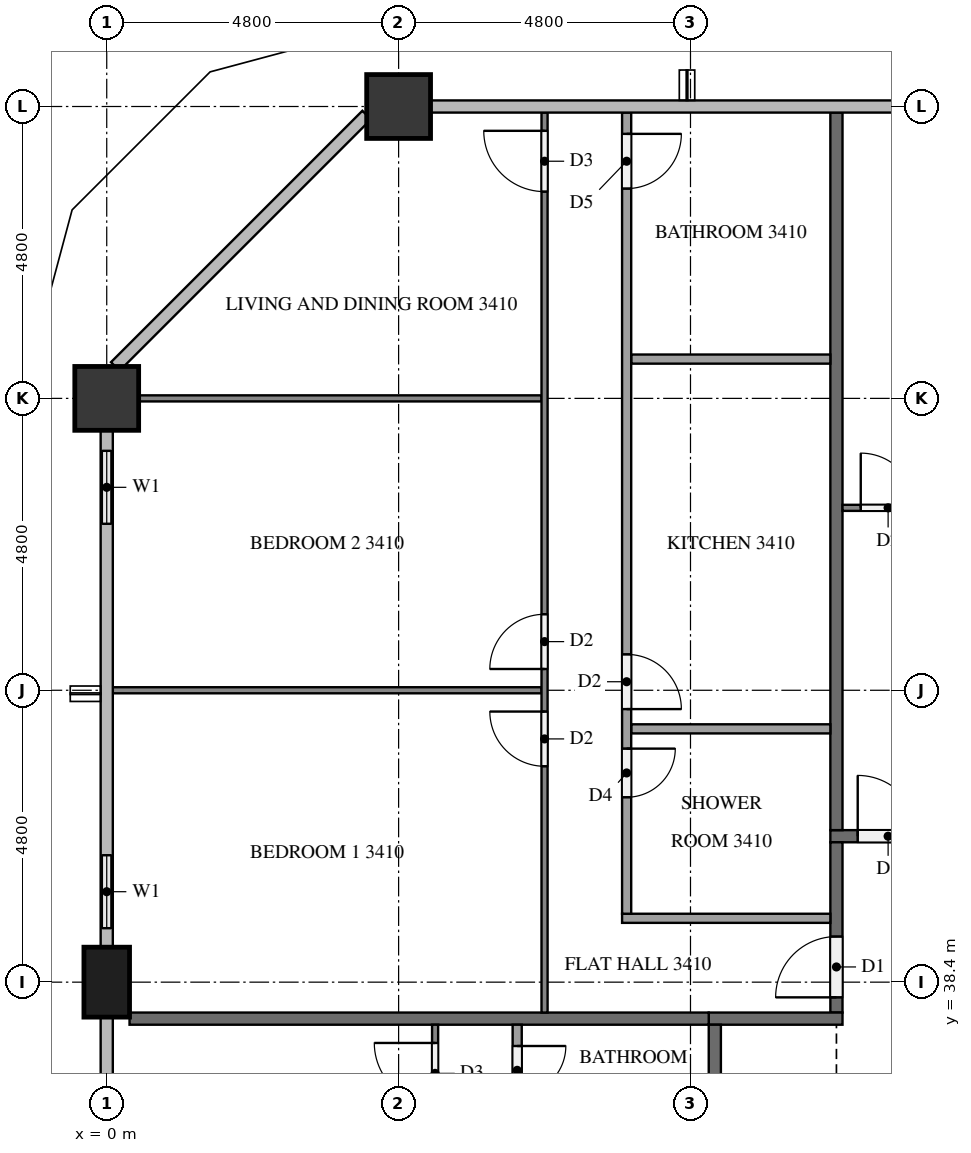
"""IFC4 building model, lengths in metres.
Left out: names, types, materials, properties, quantities, classifications, styles, units other than length and angle.
Written with IfcOpenShell. Run it as: python <this file> out.ifc"""

import sys

from ifc_helpers import new_model, si_unit, direction, frame, frame_2d, origin, origin_2d, place, context, subcontext, project, spatial, rectangle, extrude, element, fill, save


model = new_model("IFC4")
c1 = context("Model", 3, precision=1e-05, world=origin(), true_north=direction((0.0, 1.0)))
c2 = subcontext(c1, "Body", "Model", "MODEL_VIEW")
j1 = project(units=[si_unit("LENGTHUNIT", "METRE"), si_unit("PLANEANGLEUNIT", "RADIAN")], contexts=[c1])
p1 = place(None, origin())
s1 = spatial("IfcSite", under=j1, at=p1, CompositionType="ELEMENT")
p2 = place(p1, origin())
s2 = spatial("IfcBuilding", under=s1, at=p2, CompositionType="ELEMENT")
p3 = place(p2, frame((0.0, 0.0, 133.1)))
s3 = spatial("IfcBuildingStorey", under=s2, at=p3, CompositionType="ELEMENT", Elevation=133.1)
for number, where, z_axis, x_axis in (
    (1, (4.8, 52.8, 0.0), (0.0, 0.0, 1.0), (1.0, 0.0, 0.0)),
    (2, (0.0, 48.0, 0.0), (0.0, 0.0, 1.0), (1.0, 0.0, 0.0)),
):
    element("IfcColumn", number, at=place(p3, frame(where, z_axis=z_axis, x_axis=x_axis)), inside=s3, PredefinedType="COLUMN", context=c2, shape_type="SweptSolid", body=[
        extrude(rectangle(XDim=1.05, YDim=1.05, at=origin_2d()), origin(), (0.0, 0.0, 1.0), 3.2),
    ])
p4 = place(p3, frame((0.0, 38.4, 0.0), z_axis=(0.0, 0.0, 1.0), x_axis=(0.0, 1.0, 0.0)))
e3 = element("IfcColumn", 3, at=p4, inside=s3, PredefinedType="COLUMN", context=c2, shape_type="SweptSolid", body=[
    extrude(rectangle(XDim=1.15, YDim=0.75, at=origin_2d()), origin(), (0.0, 0.0, 1.0), 3.2),
])
p5 = place(p3, frame((0.0, 47.475, 0.0), z_axis=(0.0, 0.0, 1.0), x_axis=(0.0, -1.0, 0.0)))
e4 = element("IfcWall", 4, at=p5, inside=s3, PredefinedType="SOLIDWALL", context=c2, shape_type="SweptSolid", body=[
    extrude(rectangle(XDim=1.875, YDim=0.15, at=frame_2d((0.938, 0.0))), origin(), (0.0, 0.0, 1.0), 3.2),
])
p6 = place(p5, frame((0.337, 0.0, 0.9)))
e5 = element("IfcOpeningElement", 5, at=p6, cuts=e4, PredefinedType="OPENING", context=c2, shape_type="SweptSolid", body=[
    extrude(rectangle(XDim=1.2, YDim=1.4, at=frame_2d((0.6, 0.7))), frame((0.0, 0.085, 0.0), z_axis=(0.0, -1.0, 0.0), x_axis=(1.0, 0.0, 0.0)), (0.0, 0.0, 1.0), 0.17),
])
p7 = place(p3, frame((0.0, 40.8, 0.0), z_axis=(0.0, 0.0, 1.0), x_axis=(0.0, -1.0, 0.0)))
e6 = element("IfcWall", 6, at=p7, inside=s3, PredefinedType="SOLIDWALL", context=c2, shape_type="SweptSolid", body=[
    extrude(rectangle(XDim=1.825, YDim=0.15, at=frame_2d((0.913, 0.0))), origin(), (0.0, 0.0, 1.0), 3.2),
])
p8 = place(p7, frame((0.312, 0.0, 0.9)))
e7 = element("IfcOpeningElement", 7, at=p8, cuts=e6, PredefinedType="OPENING", context=c2, shape_type="SweptSolid", body=[
    extrude(rectangle(XDim=1.2, YDim=1.4, at=frame_2d((0.6, 0.7))), frame((0.0, 0.085, 0.0), z_axis=(0.0, -1.0, 0.0), x_axis=(1.0, 0.0, 0.0)), (0.0, 0.0, 1.0), 0.17),
])
p9 = place(p3, frame((11.9, 40.8, 0.0), z_axis=(0.0, 0.0, 1.0), x_axis=(1.0, 0.0, 0.0)))
e8 = element("IfcWall", 8, at=p9, inside=s3, PredefinedType="PARTITIONING", context=c2, shape_type="SweptSolid", body=[
    extrude(rectangle(XDim=38.6, YDim=0.2, at=frame_2d((19.3, 0.0))), origin(), (0.0, 0.0, 1.0), 3.2),
])
p10 = place(p9, frame((37.15, 0.0, 0.0)))
e9 = element("IfcOpeningElement", 9, at=p10, cuts=e8, PredefinedType="OPENING", context=c2, shape_type="SweptSolid", body=[
    extrude(rectangle(XDim=1.0, YDim=2.1, at=frame_2d((0.5, 1.05))), frame((0.0, 0.11, 0.0), z_axis=(0.0, -1.0, 0.0), x_axis=(1.0, 0.0, 0.0)), (0.0, 0.0, 1.0), 0.22),
])
p11 = place(p9, frame((10.05, 0.0, 0.0)))
e10 = element("IfcOpeningElement", 10, at=p11, cuts=e8, PredefinedType="OPENING", context=c2, shape_type="SweptSolid", body=[
    extrude(rectangle(XDim=1.0, YDim=2.1, at=frame_2d((0.5, 1.05))), frame((0.0, 0.11, 0.0), z_axis=(0.0, -1.0, 0.0), x_axis=(1.0, 0.0, 0.0)), (0.0, 0.0, 1.0), 0.22),
])
p12 = place(p9, frame((0.45, 0.0, 0.0)))
e11 = element("IfcOpeningElement", 11, at=p12, cuts=e8, PredefinedType="OPENING", context=c2, shape_type="SweptSolid", body=[
    extrude(rectangle(XDim=1.0, YDim=2.1, at=frame_2d((0.5, 1.05))), frame((0.0, 0.11, 0.0), z_axis=(0.0, -1.0, 0.0), x_axis=(1.0, 0.0, 0.0)), (0.0, 0.0, 1.0), 0.22),
])
p13 = place(p3, frame((12.0, 37.9, 0.0), z_axis=(0.0, 0.0, 1.0), x_axis=(0.0, 1.0, 0.0)))
e12 = element("IfcWall", 12, at=p13, inside=s3, PredefinedType="PARTITIONING", context=c2, shape_type="SweptSolid", body=[
    extrude(rectangle(XDim=2.8, YDim=0.2, at=frame_2d((1.4, 0.0))), origin(), (0.0, 0.0, 1.0), 3.2),
])
p14 = place(p13, frame((0.25, 0.0, 0.0)))
e13 = element("IfcOpeningElement", 13, at=p14, cuts=e12, PredefinedType="OPENING", context=c2, shape_type="SweptSolid", body=[
    extrude(rectangle(XDim=1.0, YDim=2.1, at=frame_2d((0.5, 1.05))), frame((0.0, 0.11, 0.0), z_axis=(0.0, -1.0, 0.0), x_axis=(1.0, 0.0, 0.0)), (0.0, 0.0, 1.0), 0.22),
])
p15 = place(p3, frame((12.1, 37.8, 0.0), z_axis=(0.0, 0.0, 1.0), x_axis=(-1.0, 0.0, 0.0)))
e14 = element("IfcWall", 14, at=p15, inside=s3, PredefinedType="PARTITIONING", context=c2, shape_type="SweptSolid", body=[
    extrude(rectangle(XDim=2.2, YDim=0.2, at=frame_2d((1.1, 0.0))), origin(), (0.0, 0.0, 1.0), 3.2),
])
p16 = place(p3, frame((10.0, 15.1, 0.0), z_axis=(0.0, 0.0, 1.0), x_axis=(0.0, 1.0, 0.0)))
e15 = element("IfcWall", 15, at=p16, inside=s3, PredefinedType="PARTITIONING", context=c2, shape_type="SweptSolid", body=[
    extrude(rectangle(XDim=22.6, YDim=0.2, at=frame_2d((11.3, 0.0))), origin(), (0.0, 0.0, 1.0), 3.2),
])
p17 = place(p16, frame((16.45, 0.0, 0.0)))
e16 = element("IfcOpeningElement", 16, at=p17, cuts=e15, PredefinedType="OPENING", context=c2, shape_type="SweptSolid", body=[
    extrude(rectangle(XDim=1.0, YDim=2.1, at=frame_2d((0.5, 1.05))), frame((0.0, 0.11, 0.0), z_axis=(0.0, -1.0, 0.0), x_axis=(1.0, 0.0, 0.0)), (0.0, 0.0, 1.0), 0.22),
])
p18 = place(p16, frame((0.25, 0.0, 0.0)))
e17 = element("IfcOpeningElement", 17, at=p18, cuts=e15, PredefinedType="OPENING", context=c2, shape_type="SweptSolid", body=[
    extrude(rectangle(XDim=1.0, YDim=2.1, at=frame_2d((0.5, 1.05))), frame((0.0, 0.11, 0.0), z_axis=(0.0, -1.0, 0.0), x_axis=(1.0, 0.0, 0.0)), (0.0, 0.0, 1.0), 0.22),
])
p19 = place(p3, frame((12.0, 52.7, 0.0), z_axis=(0.0, 0.0, 1.0), x_axis=(0.0, -1.0, 0.0)))
e18 = element("IfcWall", 18, at=p19, inside=s3, PredefinedType="PARTITIONING", context=c2, shape_type="SweptSolid", body=[
    extrude(rectangle(XDim=11.8, YDim=0.2, at=frame_2d((5.9, 0.0))), origin(), (0.0, 0.0, 1.0), 3.2),
])
p20 = place(p3, frame((0.375, 37.8, 0.0), z_axis=(0.0, 0.0, 1.0), x_axis=(1.0, 0.0, 0.0)))
e19 = element("IfcWall", 19, at=p20, inside=s3, PredefinedType="PARTITIONING", context=c2, shape_type="SweptSolid", body=[
    extrude(rectangle(XDim=9.525, YDim=0.2, at=frame_2d((4.762, 0.0))), origin(), (0.0, 0.0, 1.0), 3.2),
])
p21 = place(p3, frame((12.1, 46.2, 0.0), z_axis=(0.0, 0.0, 1.0), x_axis=(1.0, 0.0, 0.0)))
e20 = element("IfcWall", 20, at=p21, inside=s3, PredefinedType="PARTITIONING", context=c2, shape_type="SweptSolid", body=[
    extrude(rectangle(XDim=9.4, YDim=0.1, at=frame_2d((4.7, 0.0))), origin(), (0.0, 0.0, 1.0), 3.2),
])
p22 = place(p21, frame((0.3, 0.0, 0.0)))
e21 = element("IfcOpeningElement", 21, at=p22, cuts=e20, PredefinedType="OPENING", context=c2, shape_type="SweptSolid", body=[
    extrude(rectangle(XDim=0.9, YDim=2.1, at=frame_2d((0.45, 1.05))), frame((0.0, 0.06, 0.0), z_axis=(0.0, -1.0, 0.0), x_axis=(1.0, 0.0, 0.0)), (0.0, 0.0, 1.0), 0.12),
])
p23 = place(p21, frame((8.1, 0.0, 0.0)))
e22 = element("IfcOpeningElement", 22, at=p23, cuts=e20, PredefinedType="OPENING", context=c2, shape_type="SweptSolid", body=[
    extrude(rectangle(XDim=1.0, YDim=2.1, at=frame_2d((0.5, 1.05))), frame((0.0, 0.06, 0.0), z_axis=(0.0, -1.0, 0.0), x_axis=(1.0, 0.0, 0.0)), (0.0, 0.0, 1.0), 0.12),
])
p24 = place(p3, frame((7.15, 43.2, 0.0), z_axis=(0.0, 0.0, 1.0), x_axis=(-1.0, 0.0, 0.0)))
e23 = element("IfcWall", 23, at=p24, inside=s3, PredefinedType="PARTITIONING", context=c2, shape_type="SweptSolid", body=[
    extrude(rectangle(XDim=7.05, YDim=0.1, at=frame_2d((3.525, 0.0))), origin(), (0.0, 0.0, 1.0), 3.2),
])
p25 = place(p3, frame((7.15, 48.0, 0.0), z_axis=(0.0, 0.0, 1.0), x_axis=(-1.0, 0.0, 0.0)))
e24 = element("IfcWall", 24, at=p25, inside=s3, PredefinedType="PARTITIONING", context=c2, shape_type="SweptSolid", body=[
    extrude(rectangle(XDim=6.625, YDim=0.1, at=frame_2d((3.312, 0.0))), origin(), (0.0, 0.0, 1.0), 3.2),
])
p26 = place(p3, frame((7.2, 37.9, 0.0), z_axis=(0.0, 0.0, 1.0), x_axis=(0.0, 1.0, 0.0)))
e25 = element("IfcWall", 25, at=p26, inside=s3, PredefinedType="PARTITIONING", context=c2, shape_type="SweptSolid", body=[
    extrude(rectangle(XDim=14.8, YDim=0.1, at=frame_2d((7.4, 0.0))), origin(), (0.0, 0.0, 1.0), 3.2),
])
p27 = place(p26, frame((4.05, 0.0, 0.0)))
e26 = element("IfcOpeningElement", 26, at=p27, cuts=e25, PredefinedType="OPENING", context=c2, shape_type="SweptSolid", body=[
    extrude(rectangle(XDim=0.9, YDim=2.1, at=frame_2d((0.45, 1.05))), frame((0.0, 0.06, 0.0), z_axis=(0.0, -1.0, 0.0), x_axis=(1.0, 0.0, 0.0)), (0.0, 0.0, 1.0), 0.12),
])
p28 = place(p26, frame((5.65, 0.0, 0.0)))
e27 = element("IfcOpeningElement", 27, at=p28, cuts=e25, PredefinedType="OPENING", context=c2, shape_type="SweptSolid", body=[
    extrude(rectangle(XDim=0.9, YDim=2.1, at=frame_2d((0.45, 1.05))), frame((0.0, 0.06, 0.0), z_axis=(0.0, -1.0, 0.0), x_axis=(1.0, 0.0, 0.0)), (0.0, 0.0, 1.0), 0.12),
])
p29 = place(p26, frame((13.5, 0.0, 0.0)))
e28 = element("IfcOpeningElement", 28, at=p29, cuts=e25, PredefinedType="OPENING", context=c2, shape_type="SweptSolid", body=[
    extrude(rectangle(XDim=1.0, YDim=2.1, at=frame_2d((0.5, 1.05))), frame((0.0, 0.06, 0.0), z_axis=(0.0, -1.0, 0.0), x_axis=(1.0, 0.0, 0.0)), (0.0, 0.0, 1.0), 0.12),
])
for number, where, z_axis, x_axis in (
    (29, (11.9, 42.565, 0.0), (0.0, 0.0, 1.0), (-1.0, 0.0, 0.0)),
    (30, (11.9, 48.646, 0.0), (0.0, 0.0, 1.0), (-1.0, 0.0, 0.0)),
):
    element("IfcWall", number, at=place(p3, frame(where, z_axis=z_axis, x_axis=x_axis)), inside=s3, PredefinedType="PARTITIONING", context=c2, shape_type="SweptSolid", body=[
        extrude(rectangle(XDim=3.275, YDim=0.15, at=frame_2d((1.637, 0.0))), origin(), (0.0, 0.0, 1.0), 3.2),
    ])
p30 = place(p3, frame((11.9, 39.45, 0.0), z_axis=(0.0, 0.0, 1.0), x_axis=(-1.0, 0.0, 0.0)))
e31 = element("IfcWall", 31, at=p30, inside=s3, PredefinedType="PARTITIONING", context=c2, shape_type="SweptSolid", body=[
    extrude(rectangle(XDim=3.425, YDim=0.15, at=frame_2d((1.712, 0.0))), origin(), (0.0, 0.0, 1.0), 3.2),
])
p31 = place(p3, frame((8.55, 52.7, 0.0), z_axis=(0.0, 0.0, 1.0), x_axis=(0.0, -1.0, 0.0)))
e32 = element("IfcWall", 32, at=p31, inside=s3, PredefinedType="PARTITIONING", context=c2, shape_type="SweptSolid", body=[
    extrude(rectangle(XDim=13.175, YDim=0.15, at=frame_2d((6.587, 0.0))), origin(), (0.0, 0.0, 1.0), 3.2),
])
p32 = place(p31, frame((10.46, 0.0, 0.0)))
e33 = element("IfcOpeningElement", 33, at=p32, cuts=e32, PredefinedType="OPENING", context=c2, shape_type="SweptSolid", body=[
    extrude(rectangle(XDim=0.8, YDim=2.1, at=frame_2d((0.4, 1.05))), frame((0.0, 0.085, 0.0), z_axis=(0.0, -1.0, 0.0), x_axis=(1.0, 0.0, 0.0)), (0.0, 0.0, 1.0), 0.17),
])
p33 = place(p31, frame((8.91, 0.0, 0.0)))
e34 = element("IfcOpeningElement", 34, at=p33, cuts=e32, PredefinedType="OPENING", context=c2, shape_type="SweptSolid", body=[
    extrude(rectangle(XDim=0.9, YDim=2.1, at=frame_2d((0.45, 1.05))), frame((0.0, 0.085, 0.0), z_axis=(0.0, -1.0, 0.0), x_axis=(1.0, 0.0, 0.0)), (0.0, 0.0, 1.0), 0.17),
])
p34 = place(p31, frame((0.35, 0.0, 0.0)))
e35 = element("IfcOpeningElement", 35, at=p34, cuts=e32, PredefinedType="OPENING", context=c2, shape_type="SweptSolid", body=[
    extrude(rectangle(XDim=0.9, YDim=2.1, at=frame_2d((0.45, 1.05))), frame((0.0, 0.085, 0.0), z_axis=(0.0, -1.0, 0.0), x_axis=(1.0, 0.0, 0.0)), (0.0, 0.0, 1.0), 0.17),
])
p35 = place(p3, frame((5.4, 31.3, 0.0), z_axis=(0.0, 0.0, 1.0), x_axis=(0.0, 1.0, 0.0)))
e36 = element("IfcWall", 36, at=p35, inside=s3, PredefinedType="PARTITIONING", context=c2, shape_type="SweptSolid", body=[
    extrude(rectangle(XDim=6.4, YDim=0.1, at=frame_2d((3.2, 0.0))), origin(), (0.0, 0.0, 1.0), 3.2),
])
p36 = place(p35, frame((5.1, 0.0, 0.0)))
e37 = element("IfcOpeningElement", 37, at=p36, cuts=e36, PredefinedType="OPENING", context=c2, shape_type="SweptSolid", body=[
    extrude(rectangle(XDim=1.0, YDim=2.1, at=frame_2d((0.5, 1.05))), frame((0.0, 0.06, 0.0), z_axis=(0.0, -1.0, 0.0), x_axis=(1.0, 0.0, 0.0)), (0.0, 0.0, 1.0), 0.12),
])
p37 = place(p3, frame((6.75, 37.7, 0.0), z_axis=(0.0, 0.0, 1.0), x_axis=(0.0, -1.0, 0.0)))
e38 = element("IfcWall", 38, at=p37, inside=s3, PredefinedType="PARTITIONING", context=c2, shape_type="SweptSolid", body=[
    extrude(rectangle(XDim=4.775, YDim=0.15, at=frame_2d((2.387, 0.0))), origin(), (0.0, 0.0, 1.0), 3.2),
])
p38 = place(p37, frame((3.575, 0.0, 0.0)))
e39 = element("IfcOpeningElement", 39, at=p38, cuts=e38, PredefinedType="OPENING", context=c2, shape_type="SweptSolid", body=[
    extrude(rectangle(XDim=0.9, YDim=2.1, at=frame_2d((0.45, 1.05))), frame((0.0, 0.085, 0.0), z_axis=(0.0, -1.0, 0.0), x_axis=(1.0, 0.0, 0.0)), (0.0, 0.0, 1.0), 0.17),
])
p39 = place(p37, frame((0.35, 0.0, 0.0)))
e40 = element("IfcOpeningElement", 40, at=p39, cuts=e38, PredefinedType="OPENING", context=c2, shape_type="SweptSolid", body=[
    extrude(rectangle(XDim=0.8, YDim=2.1, at=frame_2d((0.4, 1.05))), frame((0.0, 0.085, 0.0), z_axis=(0.0, -1.0, 0.0), x_axis=(1.0, 0.0, 0.0)), (0.0, 0.0, 1.0), 0.17),
])
p40 = place(p6, origin())
e41 = element("IfcWindow", 41, at=p40, inside=s3, PartitioningType="SINGLE_PANEL", PredefinedType="WINDOW", context=c2, shape_type="SweptSolid", body=[
    extrude(rectangle(XDim=1.2, YDim=1.4, at=frame_2d((0.6, 0.7))), frame((0.0, 0.03, 0.0), z_axis=(0.0, -1.0, 0.0), x_axis=(1.0, 0.0, 0.0)), (0.0, 0.0, 1.0), 0.06),
])
fill(e5, e41)
p41 = place(p8, origin())
e42 = element("IfcWindow", 42, at=p41, inside=s3, PartitioningType="SINGLE_PANEL", PredefinedType="WINDOW", context=c2, shape_type="SweptSolid", body=[
    extrude(rectangle(XDim=1.2, YDim=1.4, at=frame_2d((0.6, 0.7))), frame((0.0, 0.03, 0.0), z_axis=(0.0, -1.0, 0.0), x_axis=(1.0, 0.0, 0.0)), (0.0, 0.0, 1.0), 0.06),
])
fill(e7, e42)
p42 = place(p12, origin())
e43 = element("IfcDoor", 43, at=p42, inside=s3, OperationType="SINGLE_SWING_LEFT", PredefinedType="DOOR", context=c2, shape_type="SweptSolid", body=[
    extrude(rectangle(XDim=1.0, YDim=2.1, at=frame_2d((0.5, 1.05))), frame((0.0, 0.025, 0.0), z_axis=(0.0, -1.0, 0.0), x_axis=(1.0, 0.0, 0.0)), (0.0, 0.0, 1.0), 0.05),
])
fill(e11, e43)
p43 = place(p14, origin())
e44 = element("IfcDoor", 44, at=p43, inside=s3, OperationType="SINGLE_SWING_LEFT", PredefinedType="DOOR", context=c2, shape_type="SweptSolid", body=[
    extrude(rectangle(XDim=1.0, YDim=2.1, at=frame_2d((0.5, 1.05))), frame((0.0, 0.025, 0.0), z_axis=(0.0, -1.0, 0.0), x_axis=(1.0, 0.0, 0.0)), (0.0, 0.0, 1.0), 0.05),
])
fill(e13, e44)
p44 = place(p22, origin())
e45 = element("IfcDoor", 45, at=p44, inside=s3, OperationType="SINGLE_SWING_LEFT", PredefinedType="DOOR", context=c2, shape_type="SweptSolid", body=[
    extrude(rectangle(XDim=0.9, YDim=2.1, at=frame_2d((0.45, 1.05))), frame((0.0, 0.025, 0.0), z_axis=(0.0, -1.0, 0.0), x_axis=(1.0, 0.0, 0.0)), (0.0, 0.0, 1.0), 0.05),
])
fill(e21, e45)
p45 = place(p27, origin())
e46 = element("IfcDoor", 46, at=p45, inside=s3, OperationType="SINGLE_SWING_RIGHT", PredefinedType="DOOR", context=c2, shape_type="SweptSolid", body=[
    extrude(rectangle(XDim=0.9, YDim=2.1, at=frame_2d((0.45, 1.05))), frame((0.0, 0.025, 0.0), z_axis=(0.0, -1.0, 0.0), x_axis=(1.0, 0.0, 0.0)), (0.0, 0.0, 1.0), 0.05),
])
fill(e26, e46)
p46 = place(p28, origin())
e47 = element("IfcDoor", 47, at=p46, inside=s3, OperationType="SINGLE_SWING_LEFT", PredefinedType="DOOR", context=c2, shape_type="SweptSolid", body=[
    extrude(rectangle(XDim=0.9, YDim=2.1, at=frame_2d((0.45, 1.05))), frame((0.0, 0.025, 0.0), z_axis=(0.0, -1.0, 0.0), x_axis=(1.0, 0.0, 0.0)), (0.0, 0.0, 1.0), 0.05),
])
fill(e27, e47)
p47 = place(p29, origin())
e48 = element("IfcDoor", 48, at=p47, inside=s3, OperationType="SINGLE_SWING_RIGHT", PredefinedType="DOOR", context=c2, shape_type="SweptSolid", body=[
    extrude(rectangle(XDim=1.0, YDim=2.1, at=frame_2d((0.5, 1.05))), frame((0.0, 0.025, 0.0), z_axis=(0.0, -1.0, 0.0), x_axis=(1.0, 0.0, 0.0)), (0.0, 0.0, 1.0), 0.05),
])
fill(e28, e48)
p48 = place(p32, origin())
e49 = element("IfcDoor", 49, at=p48, inside=s3, OperationType="SINGLE_SWING_LEFT", PredefinedType="DOOR", context=c2, shape_type="SweptSolid", body=[
    extrude(rectangle(XDim=0.8, YDim=2.1, at=frame_2d((0.4, 1.05))), frame((0.0, 0.025, 0.0), z_axis=(0.0, -1.0, 0.0), x_axis=(1.0, 0.0, 0.0)), (0.0, 0.0, 1.0), 0.05),
])
fill(e33, e49)
p49 = place(p33, origin())
e50 = element("IfcDoor", 50, at=p49, inside=s3, OperationType="SINGLE_SWING_RIGHT", PredefinedType="DOOR", context=c2, shape_type="SweptSolid", body=[
    extrude(rectangle(XDim=0.9, YDim=2.1, at=frame_2d((0.45, 1.05))), frame((0.0, 0.025, 0.0), z_axis=(0.0, -1.0, 0.0), x_axis=(1.0, 0.0, 0.0)), (0.0, 0.0, 1.0), 0.05),
])
fill(e34, e50)
p50 = place(p34, origin())
e51 = element("IfcDoor", 51, at=p50, inside=s3, OperationType="SINGLE_SWING_LEFT", PredefinedType="DOOR", context=c2, shape_type="SweptSolid", body=[
    extrude(rectangle(XDim=0.9, YDim=2.1, at=frame_2d((0.45, 1.05))), frame((0.0, 0.025, 0.0), z_axis=(0.0, -1.0, 0.0), x_axis=(1.0, 0.0, 0.0)), (0.0, 0.0, 1.0), 0.05),
])
fill(e35, e51)
p51 = place(p36, origin())
e52 = element("IfcDoor", 52, at=p51, inside=s3, OperationType="SINGLE_SWING_RIGHT", PredefinedType="DOOR", context=c2, shape_type="SweptSolid", body=[
    extrude(rectangle(XDim=1.0, YDim=2.1, at=frame_2d((0.5, 1.05))), frame((0.0, 0.025, 0.0), z_axis=(0.0, -1.0, 0.0), x_axis=(1.0, 0.0, 0.0)), (0.0, 0.0, 1.0), 0.05),
])
fill(e37, e52)
p52 = place(p39, origin())
e53 = element("IfcDoor", 53, at=p52, inside=s3, OperationType="SINGLE_SWING_LEFT", PredefinedType="DOOR", context=c2, shape_type="SweptSolid", body=[
    extrude(rectangle(XDim=0.8, YDim=2.1, at=frame_2d((0.4, 1.05))), frame((0.0, 0.025, 0.0), z_axis=(0.0, -1.0, 0.0), x_axis=(1.0, 0.0, 0.0)), (0.0, 0.0, 1.0), 0.05),
])
fill(e40, e53)
save(model, sys.argv[1])
